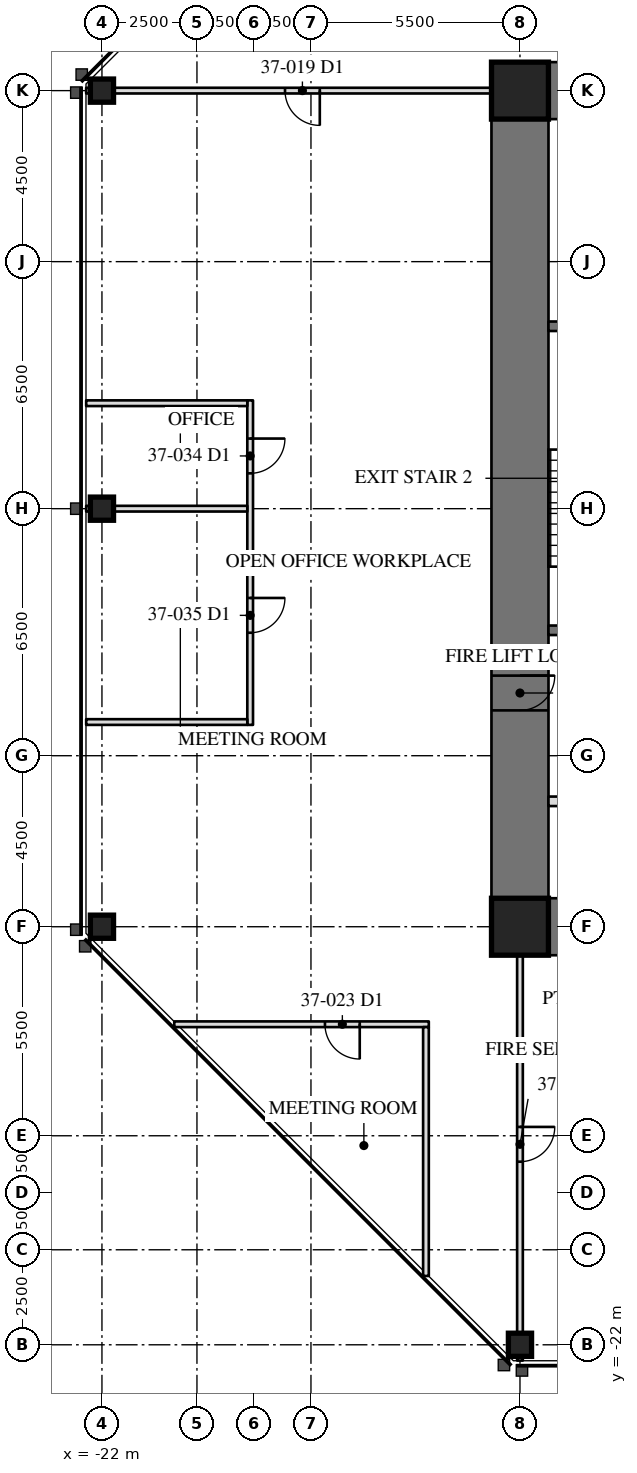
"""IFC4 building model, lengths in metres.
Left out: names, types, materials, properties, quantities, classifications, styles, units other than length and angle.
Written with IfcOpenShell. Run it as: python <this file> out.ifc"""

import sys

from ifc_helpers import new_model, si_unit, direction, frame, frame_2d, origin, origin_2d, place, context, subcontext, project, spatial, rectangle, hollow_rectangle, extrude, element, fill, save


model = new_model("IFC4")
c1 = context("Model", 3, precision=1e-05, world=origin(), true_north=direction((0.0, 1.0)))
c2 = subcontext(c1, "Body", "Model", "MODEL_VIEW")
j1 = project(units=[si_unit("LENGTHUNIT", "METRE"), si_unit("PLANEANGLEUNIT", "RADIAN")], contexts=[c1])
p1 = place(None, origin())
s1 = spatial("IfcSite", under=j1, at=p1, CompositionType="ELEMENT")
p2 = place(p1, origin())
s2 = spatial("IfcBuilding", under=s1, at=p2, CompositionType="ELEMENT")
p3 = place(p2, frame((0.0, 0.0, 158.2)))
s3 = spatial("IfcBuildingStorey", under=s2, at=p3, CompositionType="ELEMENT", Elevation=158.2)
for number, where, z_axis, x_axis in (
    (1, (-22.0, 0.0, 0.0), (0.0, 0.0, 1.0), (0.0, 1.0, 0.0)),
    (2, (-22.0, -11.0, 0.0), (0.0, 0.0, 1.0), (0.0, 1.0, 0.0)),
    (3, (-11.0, -22.0, 0.0), (0.0, 0.0, 1.0), (1.0, 0.0, 0.0)),
    (4, (-22.0, 11.0, 0.0), (0.0, 0.0, 1.0), (0.0, 1.0, 0.0)),
):
    element("IfcColumn", number, at=place(p3, frame(where, z_axis=z_axis, x_axis=x_axis)), inside=s3, PredefinedType="COLUMN", context=c2, shape_type="SweptSolid", body=[
        extrude(hollow_rectangle(XDim=0.61, YDim=0.61, WallThickness=0.076, at=origin_2d()), origin(), (0.0, 0.0, 1.0), 4.1),
    ])
p4 = place(p3, frame((-11.0, 11.0, 0.0), z_axis=(0.0, 0.0, 1.0), x_axis=(0.0, -1.0, 0.0)))
e5 = element("IfcWall", 5, at=p4, inside=s3, PredefinedType="SHEAR", context=c2, shape_type="SweptSolid", body=[
    extrude(rectangle(XDim=22.0, YDim=1.5, at=frame_2d((11.0, 0.0))), origin(), (0.0, 0.0, 1.0), 4.1),
])
p5 = place(p4, frame((15.393, 0.0, 0.0)))
e6 = element("IfcOpeningElement", 6, at=p5, cuts=e5, PredefinedType="OPENING", context=c2, shape_type="SweptSolid", body=[
    extrude(rectangle(XDim=0.915, YDim=2.134, at=frame_2d((0.458, 1.067))), frame((0.0, 0.76, 0.0), z_axis=(0.0, -1.0, 0.0), x_axis=(1.0, 0.0, 0.0)), (0.0, 0.0, 1.0), 1.52),
])
for number, where, z_axis, x_axis in (
    (7, (-6.5, 11.0, 0.0), (0.0, 0.0, 1.0), (-1.0, 0.0, 0.0)),
    (8, (-11.0, -11.0, 0.0), (0.0, 0.0, 1.0), (1.0, 0.0, 0.0)),
):
    element("IfcWall", number, at=place(p3, frame(where, z_axis=z_axis, x_axis=x_axis)), inside=s3, PredefinedType="SHEAR", context=c2, shape_type="SweptSolid", body=[
        extrude(rectangle(XDim=4.5, YDim=1.5, at=frame_2d((2.25, 0.0))), origin(), (0.0, 0.0, 1.0), 4.1),
    ])
for number, where, z_axis, x_axis in (
    (9, (-11.0, 11.0, 0.0), (0.0, 0.0, 1.0), (1.0, 0.0, 0.0)),
    (10, (-11.0, -11.0, 0.0), (0.0, 0.0, 1.0), (1.0, 0.0, 0.0)),
):
    element("IfcColumn", number, at=place(p3, frame(where, z_axis=z_axis, x_axis=x_axis)), inside=s3, PredefinedType="COLUMN", context=c2, shape_type="SweptSolid", body=[
        extrude(hollow_rectangle(XDim=1.499, YDim=1.499, WallThickness=0.102, at=origin_2d()), origin(), (0.0, 0.0, 1.0), 4.1),
    ])
p6 = place(p3, frame((-6.95, 4.8, 0.0), z_axis=(0.0, 0.0, 1.0), x_axis=(-1.0, 0.0, 0.0)))
e11 = element("IfcWall", 11, at=p6, inside=s3, PredefinedType="SOLIDWALL", context=c2, shape_type="SweptSolid", body=[
    extrude(rectangle(XDim=3.3, YDim=0.25, at=frame_2d((1.65, 0.0))), origin(), (0.0, 0.0, 1.0), 3.91),
])
p7 = place(p3, frame((-6.95, -3.2, 0.0), z_axis=(0.0, 0.0, 1.0), x_axis=(-1.0, 0.0, 0.0)))
e12 = element("IfcWall", 12, at=p7, inside=s3, PredefinedType="SOLIDWALL", context=c2, shape_type="SweptSolid", body=[
    extrude(rectangle(XDim=3.3, YDim=0.25, at=frame_2d((1.65, 0.0))), origin(), (0.0, 0.0, 1.0), 3.91),
])
p8 = place(p7, frame((1.116, 0.0, 0.0)))
e13 = element("IfcOpeningElement", 13, at=p8, cuts=e12, PredefinedType="OPENING", context=c2, shape_type="SweptSolid", body=[
    extrude(rectangle(XDim=1.067, YDim=2.134, at=frame_2d((0.533, 1.067))), frame((0.0, 0.135, 0.0), z_axis=(0.0, -1.0, 0.0), x_axis=(1.0, 0.0, 0.0)), (0.0, 0.0, 1.0), 0.27),
])
p9 = place(p3, frame((-6.95, -7.7, 0.0), z_axis=(0.0, 0.0, 1.0), x_axis=(-1.0, 0.0, 0.0)))
e14 = element("IfcWall", 14, at=p9, inside=s3, PredefinedType="PARTITIONING", context=c2, shape_type="SweptSolid", body=[
    extrude(rectangle(XDim=3.3, YDim=0.25, at=frame_2d((1.65, 0.0))), origin(), (0.0, 0.0, 1.0), 3.91),
])
p10 = place(p9, frame((0.45, 0.0, 0.0)))
e15 = element("IfcOpeningElement", 15, at=p10, cuts=e14, PredefinedType="OPENING", context=c2, shape_type="SweptSolid", body=[
    extrude(rectangle(XDim=1.219, YDim=2.134, at=frame_2d((0.609, 1.067))), frame((0.0, 0.135, 0.0), z_axis=(0.0, -1.0, 0.0), x_axis=(1.0, 0.0, 0.0)), (0.0, 0.0, 1.0), 0.27),
])
p11 = place(p3, frame((-11.75, 11.0, 0.0), z_axis=(0.0, 0.0, 1.0), x_axis=(-1.0, 0.0, 0.0)))
e16 = element("IfcWall", 16, at=p11, inside=s3, PredefinedType="PARTITIONING", context=c2, shape_type="SweptSolid", body=[
    extrude(rectangle(XDim=10.665, YDim=0.15, at=frame_2d((5.333, 0.0))), origin(), (0.0, 0.0, 1.0), 3.326),
])
p12 = place(p11, frame((4.518, 0.0, 0.0)))
e17 = element("IfcOpeningElement", 17, at=p12, cuts=e16, PredefinedType="OPENING", context=c2, shape_type="SweptSolid", body=[
    extrude(rectangle(XDim=0.915, YDim=2.134, at=frame_2d((0.458, 1.067))), frame((0.0, 0.085, 0.0), z_axis=(0.0, -1.0, 0.0), x_axis=(1.0, 0.0, 0.0)), (0.0, 0.0, 1.0), 0.17),
])
p13 = place(p3, frame((-11.0, -11.75, 0.0), z_axis=(0.0, 0.0, 1.0), x_axis=(0.0, -1.0, 0.0)))
e18 = element("IfcWall", 18, at=p13, inside=s3, PredefinedType="PARTITIONING", context=c2, shape_type="SweptSolid", body=[
    extrude(rectangle(XDim=10.665, YDim=0.15, at=frame_2d((5.333, 0.0))), origin(), (0.0, 0.0, 1.0), 3.326),
])
p14 = place(p13, frame((4.518, 0.0, 0.0)))
e19 = element("IfcOpeningElement", 19, at=p14, cuts=e18, PredefinedType="OPENING", context=c2, shape_type="SweptSolid", body=[
    extrude(rectangle(XDim=0.915, YDim=2.134, at=frame_2d((0.458, 1.067))), frame((0.0, 0.085, 0.0), z_axis=(0.0, -1.0, 0.0), x_axis=(1.0, 0.0, 0.0)), (0.0, 0.0, 1.0), 0.17),
])
p15 = place(p3, frame((-13.399, -13.566, 0.0), z_axis=(0.0, 0.0, 1.0), x_axis=(-1.0, 0.0, 0.0)))
e20 = element("IfcWall", 20, at=p15, inside=s3, PredefinedType="PARTITIONING", context=c2, shape_type="SweptSolid", body=[
    extrude(rectangle(XDim=6.698, YDim=0.15, at=frame_2d((3.349, 0.0))), origin(), (0.0, 0.0, 1.0), 3.91),
])
p16 = place(p15, frame((1.817, 0.0, 0.0)))
e21 = element("IfcOpeningElement", 21, at=p16, cuts=e20, PredefinedType="OPENING", context=c2, shape_type="SweptSolid", body=[
    extrude(rectangle(XDim=0.915, YDim=2.134, at=frame_2d((0.458, 1.067))), frame((0.0, 0.085, 0.0), z_axis=(0.0, -1.0, 0.0), x_axis=(1.0, 0.0, 0.0)), (0.0, 0.0, 1.0), 0.17),
])
p17 = place(p3, frame((-13.474, -13.641, 0.0), z_axis=(0.0, 0.0, 1.0), x_axis=(0.0, -1.0, 0.0)))
e22 = element("IfcWall", 22, at=p17, inside=s3, PredefinedType="PARTITIONING", context=c2, shape_type="SweptSolid", body=[
    extrude(rectangle(XDim=6.548, YDim=0.15, at=frame_2d((3.274, 0.0))), origin(), (0.0, 0.0, 1.0), 3.91),
])
p18 = place(p3, frame((-18.1, 2.85, 0.0), z_axis=(0.0, 0.0, 1.0), x_axis=(0.0, -1.0, 0.0)))
e23 = element("IfcWall", 23, at=p18, inside=s3, PredefinedType="PARTITIONING", context=c2, shape_type="SweptSolid", body=[
    extrude(rectangle(XDim=8.539, YDim=0.15, at=frame_2d((4.27, 0.0))), origin(), (0.0, 0.0, 1.0), 3.91),
])
p19 = place(p18, frame((1.005, 0.0, 0.0)))
e24 = element("IfcOpeningElement", 24, at=p19, cuts=e23, PredefinedType="OPENING", context=c2, shape_type="SweptSolid", body=[
    extrude(rectangle(XDim=0.915, YDim=2.134, at=frame_2d((0.458, 1.067))), frame((0.0, 0.085, 0.0), z_axis=(0.0, -1.0, 0.0), x_axis=(1.0, 0.0, 0.0)), (0.0, 0.0, 1.0), 0.17),
])
p20 = place(p18, frame((5.199, 0.0, 0.0)))
e25 = element("IfcOpeningElement", 25, at=p20, cuts=e23, PredefinedType="OPENING", context=c2, shape_type="SweptSolid", body=[
    extrude(rectangle(XDim=0.915, YDim=2.134, at=frame_2d((0.458, 1.067))), frame((0.0, 0.085, 0.0), z_axis=(0.0, -1.0, 0.0), x_axis=(1.0, 0.0, 0.0)), (0.0, 0.0, 1.0), 0.17),
])
p21 = place(p3, frame((-18.175, 2.775, 0.0), z_axis=(0.0, 0.0, 1.0), x_axis=(-1.0, 0.0, 0.0)))
e26 = element("IfcWall", 26, at=p21, inside=s3, PredefinedType="PARTITIONING", context=c2, shape_type="SweptSolid", body=[
    extrude(rectangle(XDim=4.24, YDim=0.15, at=frame_2d((2.12, 0.0))), origin(), (0.0, 0.0, 1.0), 3.91),
])
p22 = place(p3, frame((-18.175, 0.0, 0.0), z_axis=(0.0, 0.0, 1.0), x_axis=(-1.0, 0.0, 0.0)))
e27 = element("IfcWall", 27, at=p22, inside=s3, PredefinedType="PARTITIONING", context=c2, shape_type="SweptSolid", body=[
    extrude(rectangle(XDim=4.24, YDim=0.15, at=frame_2d((2.12, 0.0))), origin(), (0.0, 0.0, 1.0), 3.326),
])
p23 = place(p3, frame((-18.175, -5.614, 0.0), z_axis=(0.0, 0.0, 1.0), x_axis=(-1.0, 0.0, 0.0)))
e28 = element("IfcWall", 28, at=p23, inside=s3, PredefinedType="PARTITIONING", context=c2, shape_type="SweptSolid", body=[
    extrude(rectangle(XDim=4.24, YDim=0.15, at=frame_2d((2.12, 0.0))), origin(), (0.0, 0.0, 1.0), 3.91),
])
p24 = place(p5, origin())
e29 = element("IfcDoor", 29, at=p24, inside=s3, OperationType="SINGLE_SWING_RIGHT", PredefinedType="DOOR", context=c2, shape_type="SweptSolid", body=[
    extrude(rectangle(XDim=0.915, YDim=2.134, at=frame_2d((0.458, 1.067))), frame((0.0, -0.675, 0.0), z_axis=(0.0, -1.0, 0.0), x_axis=(1.0, 0.0, 0.0)), (0.0, 0.0, 1.0), 0.05),
])
fill(e6, e29)
p25 = place(p12, origin())
e30 = element("IfcDoor", 30, at=p25, inside=s3, OperationType="SINGLE_SWING_LEFT", PredefinedType="DOOR", context=c2, shape_type="SweptSolid", body=[
    extrude(rectangle(XDim=0.915, YDim=2.134, at=frame_2d((0.458, 1.067))), frame((0.0, 0.025, 0.0), z_axis=(0.0, -1.0, 0.0), x_axis=(1.0, 0.0, 0.0)), (0.0, 0.0, 1.0), 0.05),
])
fill(e17, e30)
p26 = place(p14, origin())
e31 = element("IfcDoor", 31, at=p26, inside=s3, OperationType="SINGLE_SWING_LEFT", PredefinedType="DOOR", context=c2, shape_type="SweptSolid", body=[
    extrude(rectangle(XDim=0.915, YDim=2.134, at=frame_2d((0.458, 1.067))), frame((0.0, 0.025, 0.0), z_axis=(0.0, -1.0, 0.0), x_axis=(1.0, 0.0, 0.0)), (0.0, 0.0, 1.0), 0.05),
])
fill(e19, e31)
p27 = place(p16, origin())
e32 = element("IfcDoor", 32, at=p27, inside=s3, OperationType="SINGLE_SWING_LEFT", PredefinedType="DOOR", context=c2, shape_type="SweptSolid", body=[
    extrude(rectangle(XDim=0.915, YDim=2.134, at=frame_2d((0.458, 1.067))), frame((0.0, 0.025, 0.0), z_axis=(0.0, -1.0, 0.0), x_axis=(1.0, 0.0, 0.0)), (0.0, 0.0, 1.0), 0.05),
])
fill(e21, e32)
p28 = place(p19, origin())
e33 = element("IfcDoor", 33, at=p28, inside=s3, OperationType="SINGLE_SWING_LEFT", PredefinedType="DOOR", context=c2, shape_type="SweptSolid", body=[
    extrude(rectangle(XDim=0.915, YDim=2.134, at=frame_2d((0.458, 1.067))), frame((0.0, 0.025, 0.0), z_axis=(0.0, -1.0, 0.0), x_axis=(1.0, 0.0, 0.0)), (0.0, 0.0, 1.0), 0.05),
])
fill(e24, e33)
p29 = place(p20, origin())
e34 = element("IfcDoor", 34, at=p29, inside=s3, OperationType="SINGLE_SWING_LEFT", PredefinedType="DOOR", context=c2, shape_type="SweptSolid", body=[
    extrude(rectangle(XDim=0.915, YDim=2.134, at=frame_2d((0.458, 1.067))), frame((0.0, 0.025, 0.0), z_axis=(0.0, -1.0, 0.0), x_axis=(1.0, 0.0, 0.0)), (0.0, 0.0, 1.0), 0.05),
])
fill(e25, e34)
save(model, sys.argv[1])
